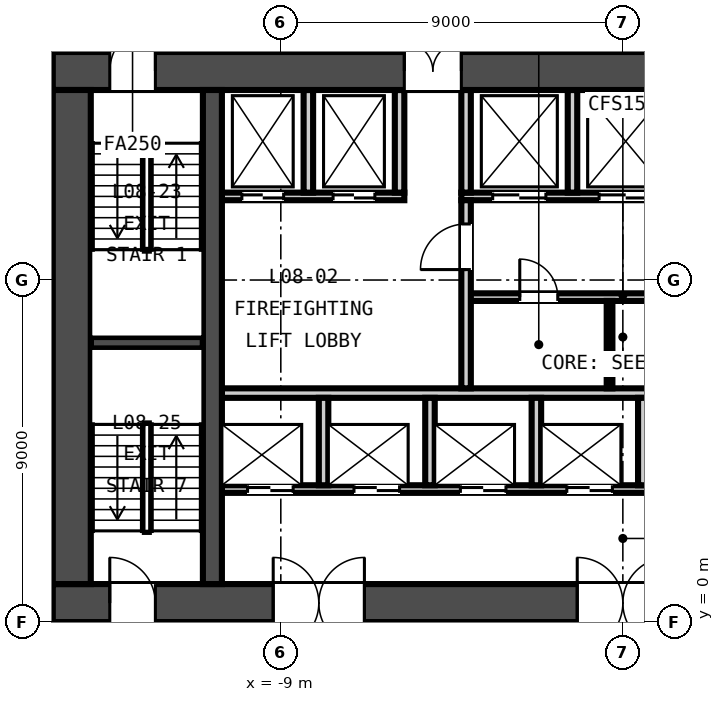
"""IFC4 building model, lengths in metres.
Left out: names, types, materials, properties, quantities, classifications, styles, units other than length and angle.
Written with IfcOpenShell. Run it as: python <this file> out.ifc"""

import sys

from ifc_helpers import new_model, si_unit, direction, frame, frame_2d, origin, place, context, subcontext, project, spatial, rectangle, extrude, element, fill, save


model = new_model("IFC4")
c1 = context("Model", 3, precision=1e-05, world=origin(), true_north=direction((0.0, 1.0)))
c2 = subcontext(c1, "Body", "Model", "MODEL_VIEW")
j1 = project(units=[si_unit("LENGTHUNIT", "METRE"), si_unit("PLANEANGLEUNIT", "RADIAN")], contexts=[c1])
p1 = place(None, origin())
s1 = spatial("IfcSite", under=j1, at=p1, CompositionType="ELEMENT")
p2 = place(p1, origin())
s2 = spatial("IfcBuilding", under=s1, at=p2, CompositionType="ELEMENT")
p3 = place(p2, frame((0.0, 0.0, 43.3)))
s3 = spatial("IfcBuildingStorey", under=s2, at=p3, CompositionType="ELEMENT", Elevation=43.3)
p4 = place(p3, frame((-15.0, 0.5, -0.15), z_axis=(0.0, 0.0, 1.0), x_axis=(1.0, 0.0, 0.0)))
e1 = element("IfcWall", 1, at=p4, inside=s3, PredefinedType="SOLIDWALL", context=c2, shape_type="SweptSolid", body=[
    extrude(rectangle(XDim=30.0, YDim=1.0, at=frame_2d((15.0, 0.0))), origin(), (0.0, 0.0, 1.0), 3.65),
])
p5 = place(p4, frame((5.8, 0.0, 0.15)))
e2 = element("IfcOpeningElement", 2, at=p5, cuts=e1, PredefinedType="OPENING", context=c2, shape_type="SweptSolid", body=[
    extrude(rectangle(XDim=2.4, YDim=2.4, at=frame_2d((1.2, 1.2))), frame((0.0, 0.51, 0.0), z_axis=(0.0, -1.0, 0.0), x_axis=(1.0, 0.0, 0.0)), (0.0, 0.0, 1.0), 1.02),
])
p6 = place(p4, frame((13.8, 0.0, 0.15)))
e3 = element("IfcOpeningElement", 3, at=p6, cuts=e1, PredefinedType="OPENING", context=c2, shape_type="SweptSolid", body=[
    extrude(rectangle(XDim=2.4, YDim=2.4, at=frame_2d((1.2, 1.2))), frame((0.0, 0.51, 0.0), z_axis=(0.0, -1.0, 0.0), x_axis=(1.0, 0.0, 0.0)), (0.0, 0.0, 1.0), 1.02),
])
p7 = place(p4, frame((21.8, 0.0, 0.15)))
e4 = element("IfcOpeningElement", 4, at=p7, cuts=e1, PredefinedType="OPENING", context=c2, shape_type="SweptSolid", body=[
    extrude(rectangle(XDim=2.4, YDim=2.4, at=frame_2d((1.2, 1.2))), frame((0.0, 0.51, 0.0), z_axis=(0.0, -1.0, 0.0), x_axis=(1.0, 0.0, 0.0)), (0.0, 0.0, 1.0), 1.02),
])
p8 = place(p4, frame((1.5, 0.0, 0.15)))
e5 = element("IfcOpeningElement", 5, at=p8, cuts=e1, PredefinedType="OPENING", context=c2, shape_type="SweptSolid", body=[
    extrude(rectangle(XDim=1.2, YDim=2.1, at=frame_2d((0.6, 1.05))), frame((0.0, 0.51, 0.0), z_axis=(0.0, -1.0, 0.0), x_axis=(1.0, 0.0, 0.0)), (0.0, 0.0, 1.0), 1.02),
])
p9 = place(p4, frame((27.3, 0.0, 0.15)))
e6 = element("IfcOpeningElement", 6, at=p9, cuts=e1, PredefinedType="OPENING", context=c2, shape_type="SweptSolid", body=[
    extrude(rectangle(XDim=1.2, YDim=2.1, at=frame_2d((0.6, 1.05))), frame((0.0, 0.51, 0.0), z_axis=(0.0, -1.0, 0.0), x_axis=(1.0, 0.0, 0.0)), (0.0, 0.0, 1.0), 1.02),
])
p10 = place(p3, frame((-15.0, 14.5, -0.15), z_axis=(0.0, 0.0, 1.0), x_axis=(1.0, 0.0, 0.0)))
e7 = element("IfcWall", 7, at=p10, inside=s3, PredefinedType="SOLIDWALL", context=c2, shape_type="SweptSolid", body=[
    extrude(rectangle(XDim=30.0, YDim=1.0, at=frame_2d((15.0, 0.0))), origin(), (0.0, 0.0, 1.0), 3.65),
])
p11 = place(p10, frame((9.25, 0.0, 0.15)))
e8 = element("IfcOpeningElement", 8, at=p11, cuts=e7, PredefinedType="OPENING", context=c2, shape_type="SweptSolid", body=[
    extrude(rectangle(XDim=1.5, YDim=2.1, at=frame_2d((0.75, 1.05))), frame((0.0, 0.51, 0.0), z_axis=(0.0, -1.0, 0.0), x_axis=(1.0, 0.0, 0.0)), (0.0, 0.0, 1.0), 1.02),
])
p12 = place(p10, frame((19.4, 0.0, 0.15)))
e9 = element("IfcOpeningElement", 9, at=p12, cuts=e7, PredefinedType="OPENING", context=c2, shape_type="SweptSolid", body=[
    extrude(rectangle(XDim=1.5, YDim=2.1, at=frame_2d((0.75, 1.05))), frame((0.0, 0.51, 0.0), z_axis=(0.0, -1.0, 0.0), x_axis=(1.0, 0.0, 0.0)), (0.0, 0.0, 1.0), 1.02),
])
p13 = place(p10, frame((1.5, 0.0, 0.15)))
e10 = element("IfcOpeningElement", 10, at=p13, cuts=e7, PredefinedType="OPENING", context=c2, shape_type="SweptSolid", body=[
    extrude(rectangle(XDim=1.2, YDim=2.1, at=frame_2d((0.6, 1.05))), frame((0.0, 0.51, 0.0), z_axis=(0.0, -1.0, 0.0), x_axis=(1.0, 0.0, 0.0)), (0.0, 0.0, 1.0), 1.02),
])
p14 = place(p10, frame((27.3, 0.0, 0.15)))
e11 = element("IfcOpeningElement", 11, at=p14, cuts=e7, PredefinedType="OPENING", context=c2, shape_type="SweptSolid", body=[
    extrude(rectangle(XDim=1.2, YDim=2.1, at=frame_2d((0.6, 1.05))), frame((0.0, 0.51, 0.0), z_axis=(0.0, -1.0, 0.0), x_axis=(1.0, 0.0, 0.0)), (0.0, 0.0, 1.0), 1.02),
])
p15 = place(p3, frame((-14.5, 1.0, -0.15), z_axis=(0.0, 0.0, 1.0), x_axis=(0.0, 1.0, 0.0)))
e12 = element("IfcWall", 12, at=p15, inside=s3, PredefinedType="SOLIDWALL", context=c2, shape_type="SweptSolid", body=[
    extrude(rectangle(XDim=13.0, YDim=1.0, at=frame_2d((6.5, 0.0))), origin(), (0.0, 0.0, 1.0), 3.65),
])
p16 = place(p3, frame((-10.8, 1.0, -0.15), z_axis=(0.0, 0.0, 1.0), x_axis=(0.0, 1.0, 0.0)))
e13 = element("IfcWall", 13, at=p16, inside=s3, PredefinedType="SOLIDWALL", context=c2, shape_type="SweptSolid", body=[
    extrude(rectangle(XDim=13.0, YDim=0.5, at=frame_2d((6.5, 0.0))), origin(), (0.0, 0.0, 1.0), 3.65),
])
p17 = place(p3, frame((-10.55, 3.5, 0.0), z_axis=(0.0, 0.0, 1.0), x_axis=(1.0, 0.0, 0.0)))
e14 = element("IfcWall", 14, at=p17, inside=s3, PredefinedType="PARTITIONING", context=c2, shape_type="SweptSolid", body=[
    extrude(rectangle(XDim=21.1, YDim=0.2, at=frame_2d((10.55, 0.0))), origin(), (0.0, 0.0, 1.0), 3.5),
])
p18 = place(p17, frame((0.675, 0.0, 0.0)))
e15 = element("IfcOpeningElement", 15, at=p18, cuts=e14, PredefinedType="OPENING", context=c2, shape_type="SweptSolid", body=[
    extrude(rectangle(XDim=1.2, YDim=2.1, at=frame_2d((0.6, 1.05))), frame((0.0, 0.11, 0.0), z_axis=(0.0, -1.0, 0.0), x_axis=(1.0, 0.0, 0.0)), (0.0, 0.0, 1.0), 0.22),
])
p19 = place(p17, frame((3.475, 0.0, 0.0)))
e16 = element("IfcOpeningElement", 16, at=p19, cuts=e14, PredefinedType="OPENING", context=c2, shape_type="SweptSolid", body=[
    extrude(rectangle(XDim=1.2, YDim=2.1, at=frame_2d((0.6, 1.05))), frame((0.0, 0.11, 0.0), z_axis=(0.0, -1.0, 0.0), x_axis=(1.0, 0.0, 0.0)), (0.0, 0.0, 1.0), 0.22),
])
p20 = place(p17, frame((6.275, 0.0, 0.0)))
e17 = element("IfcOpeningElement", 17, at=p20, cuts=e14, PredefinedType="OPENING", context=c2, shape_type="SweptSolid", body=[
    extrude(rectangle(XDim=1.2, YDim=2.1, at=frame_2d((0.6, 1.05))), frame((0.0, 0.11, 0.0), z_axis=(0.0, -1.0, 0.0), x_axis=(1.0, 0.0, 0.0)), (0.0, 0.0, 1.0), 0.22),
])
p21 = place(p17, frame((9.075, 0.0, 0.0)))
e18 = element("IfcOpeningElement", 18, at=p21, cuts=e14, PredefinedType="OPENING", context=c2, shape_type="SweptSolid", body=[
    extrude(rectangle(XDim=1.2, YDim=2.1, at=frame_2d((0.6, 1.05))), frame((0.0, 0.11, 0.0), z_axis=(0.0, -1.0, 0.0), x_axis=(1.0, 0.0, 0.0)), (0.0, 0.0, 1.0), 0.22),
])
p22 = place(p17, frame((11.875, 0.0, 0.0)))
e19 = element("IfcOpeningElement", 19, at=p22, cuts=e14, PredefinedType="OPENING", context=c2, shape_type="SweptSolid", body=[
    extrude(rectangle(XDim=1.2, YDim=2.1, at=frame_2d((0.6, 1.05))), frame((0.0, 0.11, 0.0), z_axis=(0.0, -1.0, 0.0), x_axis=(1.0, 0.0, 0.0)), (0.0, 0.0, 1.0), 0.22),
])
p23 = place(p17, frame((14.675, 0.0, 0.0)))
e20 = element("IfcOpeningElement", 20, at=p23, cuts=e14, PredefinedType="OPENING", context=c2, shape_type="SweptSolid", body=[
    extrude(rectangle(XDim=1.2, YDim=2.1, at=frame_2d((0.6, 1.05))), frame((0.0, 0.11, 0.0), z_axis=(0.0, -1.0, 0.0), x_axis=(1.0, 0.0, 0.0)), (0.0, 0.0, 1.0), 0.22),
])
p24 = place(p17, frame((17.475, 0.0, 0.0)))
e21 = element("IfcOpeningElement", 21, at=p24, cuts=e14, PredefinedType="OPENING", context=c2, shape_type="SweptSolid", body=[
    extrude(rectangle(XDim=1.2, YDim=2.1, at=frame_2d((0.6, 1.05))), frame((0.0, 0.11, 0.0), z_axis=(0.0, -1.0, 0.0), x_axis=(1.0, 0.0, 0.0)), (0.0, 0.0, 1.0), 0.22),
])
p25 = place(p17, frame((19.9, 0.0, 0.0)))
e22 = element("IfcOpeningElement", 22, at=p25, cuts=e14, PredefinedType="OPENING", context=c2, shape_type="SweptSolid", body=[
    extrude(rectangle(XDim=0.9, YDim=2.1, at=frame_2d((0.45, 1.05))), frame((0.0, 0.11, 0.0), z_axis=(0.0, -1.0, 0.0), x_axis=(1.0, 0.0, 0.0)), (0.0, 0.0, 1.0), 0.22),
])
p26 = place(p3, frame((-10.55, 6.025, 0.0), z_axis=(0.0, 0.0, 1.0), x_axis=(1.0, 0.0, 0.0)))
e23 = element("IfcWall", 23, at=p26, inside=s3, PredefinedType="PARTITIONING", context=c2, shape_type="SweptSolid", body=[
    extrude(rectangle(XDim=21.1, YDim=0.25, at=frame_2d((10.55, 0.0))), origin(), (0.0, 0.0, 1.0), 3.5),
])
p27 = place(p3, frame((-4.125, 8.55, 0.0), z_axis=(0.0, 0.0, 1.0), x_axis=(1.0, 0.0, 0.0)))
e24 = element("IfcWall", 24, at=p27, inside=s3, PredefinedType="PARTITIONING", context=c2, shape_type="SweptSolid", body=[
    extrude(rectangle(XDim=14.675, YDim=0.2, at=frame_2d((7.337, 0.0))), origin(), (0.0, 0.0, 1.0), 3.5),
])
p28 = place(p27, frame((1.413, 0.0, 0.0)))
e25 = element("IfcOpeningElement", 25, at=p28, cuts=e24, PredefinedType="OPENING", context=c2, shape_type="SweptSolid", body=[
    extrude(rectangle(XDim=1.0, YDim=2.1, at=frame_2d((0.5, 1.05))), frame((0.0, 0.11, 0.0), z_axis=(0.0, -1.0, 0.0), x_axis=(1.0, 0.0, 0.0)), (0.0, 0.0, 1.0), 0.22),
])
p29 = place(p27, frame((5.0, 0.0, 0.0)))
e26 = element("IfcOpeningElement", 26, at=p29, cuts=e24, PredefinedType="OPENING", context=c2, shape_type="SweptSolid", body=[
    extrude(rectangle(XDim=1.0, YDim=2.1, at=frame_2d((0.5, 1.05))), frame((0.0, 0.11, 0.0), z_axis=(0.0, -1.0, 0.0), x_axis=(1.0, 0.0, 0.0)), (0.0, 0.0, 1.0), 0.22),
])
p30 = place(p27, frame((9.613, 0.0, 0.0)))
e27 = element("IfcOpeningElement", 27, at=p30, cuts=e24, PredefinedType="OPENING", context=c2, shape_type="SweptSolid", body=[
    extrude(rectangle(XDim=1.0, YDim=2.1, at=frame_2d((0.5, 1.05))), frame((0.0, 0.11, 0.0), z_axis=(0.0, -1.0, 0.0), x_axis=(1.0, 0.0, 0.0)), (0.0, 0.0, 1.0), 0.22),
])
p31 = place(p27, frame((13.475, 0.0, 0.0)))
e28 = element("IfcOpeningElement", 28, at=p31, cuts=e24, PredefinedType="OPENING", context=c2, shape_type="SweptSolid", body=[
    extrude(rectangle(XDim=0.9, YDim=2.1, at=frame_2d((0.45, 1.05))), frame((0.0, 0.11, 0.0), z_axis=(0.0, -1.0, 0.0), x_axis=(1.0, 0.0, 0.0)), (0.0, 0.0, 1.0), 0.22),
])
p32 = place(p3, frame((-10.55, 11.2, 0.0), z_axis=(0.0, 0.0, 1.0), x_axis=(1.0, 0.0, 0.0)))
e29 = element("IfcWall", 29, at=p32, inside=s3, PredefinedType="PARTITIONING", context=c2, shape_type="SweptSolid", body=[
    extrude(rectangle(XDim=4.8, YDim=0.2, at=frame_2d((2.4, 0.0))), origin(), (0.0, 0.0, 1.0), 3.5),
])
p33 = place(p32, frame((0.525, 0.0, 0.0)))
e30 = element("IfcOpeningElement", 30, at=p33, cuts=e29, PredefinedType="OPENING", context=c2, shape_type="SweptSolid", body=[
    extrude(rectangle(XDim=1.1, YDim=2.1, at=frame_2d((0.55, 1.05))), frame((0.0, 0.11, 0.0), z_axis=(0.0, -1.0, 0.0), x_axis=(1.0, 0.0, 0.0)), (0.0, 0.0, 1.0), 0.22),
])
p34 = place(p32, frame((2.925, 0.0, 0.0)))
e31 = element("IfcOpeningElement", 31, at=p34, cuts=e29, PredefinedType="OPENING", context=c2, shape_type="SweptSolid", body=[
    extrude(rectangle(XDim=1.1, YDim=2.1, at=frame_2d((0.55, 1.05))), frame((0.0, 0.11, 0.0), z_axis=(0.0, -1.0, 0.0), x_axis=(1.0, 0.0, 0.0)), (0.0, 0.0, 1.0), 0.22),
])
p35 = place(p3, frame((-4.25, 11.2, 0.0), z_axis=(0.0, 0.0, 1.0), x_axis=(1.0, 0.0, 0.0)))
e32 = element("IfcWall", 32, at=p35, inside=s3, PredefinedType="PARTITIONING", context=c2, shape_type="SweptSolid", body=[
    extrude(rectangle(XDim=8.65, YDim=0.2, at=frame_2d((4.325, 0.0))), origin(), (0.0, 0.0, 1.0), 3.5),
])
p36 = place(p35, frame((0.825, 0.0, 0.0)))
e33 = element("IfcOpeningElement", 33, at=p36, cuts=e32, PredefinedType="OPENING", context=c2, shape_type="SweptSolid", body=[
    extrude(rectangle(XDim=1.4, YDim=2.1, at=frame_2d((0.7, 1.05))), frame((0.0, 0.11, 0.0), z_axis=(0.0, -1.0, 0.0), x_axis=(1.0, 0.0, 0.0)), (0.0, 0.0, 1.0), 0.22),
])
p37 = place(p35, frame((3.625, 0.0, 0.0)))
e34 = element("IfcOpeningElement", 34, at=p37, cuts=e32, PredefinedType="OPENING", context=c2, shape_type="SweptSolid", body=[
    extrude(rectangle(XDim=1.4, YDim=2.1, at=frame_2d((0.7, 1.05))), frame((0.0, 0.11, 0.0), z_axis=(0.0, -1.0, 0.0), x_axis=(1.0, 0.0, 0.0)), (0.0, 0.0, 1.0), 0.22),
])
p38 = place(p3, frame((-4.125, 6.15, 0.0), z_axis=(0.0, 0.0, 1.0), x_axis=(0.0, 1.0, 0.0)))
e35 = element("IfcWall", 35, at=p38, inside=s3, PredefinedType="PARTITIONING", context=c2, shape_type="SweptSolid", body=[
    extrude(rectangle(XDim=4.95, YDim=0.25, at=frame_2d((2.475, 0.0))), origin(), (0.0, 0.0, 1.0), 3.5),
])
p39 = place(p38, frame((3.125, 0.0, 0.0)))
e36 = element("IfcOpeningElement", 36, at=p39, cuts=e35, PredefinedType="OPENING", context=c2, shape_type="SweptSolid", body=[
    extrude(rectangle(XDim=1.2, YDim=2.1, at=frame_2d((0.6, 1.05))), frame((0.0, 0.135, 0.0), z_axis=(0.0, -1.0, 0.0), x_axis=(1.0, 0.0, 0.0)), (0.0, 0.0, 1.0), 0.27),
])
for number, where, z_axis, x_axis in (
    (37, (-7.875, 3.6, 0.0), (0.0, 0.0, 1.0), (0.0, 1.0, 0.0)),
    (38, (-5.075, 3.6, 0.0), (0.0, 0.0, 1.0), (0.0, 1.0, 0.0)),
    (39, (-2.275, 3.6, 0.0), (0.0, 0.0, 1.0), (0.0, 1.0, 0.0)),
    (40, (0.525, 3.6, 0.0), (0.0, 0.0, 1.0), (0.0, 1.0, 0.0)),
):
    element("IfcWall", number, at=place(p3, frame(where, z_axis=z_axis, x_axis=x_axis)), inside=s3, PredefinedType="PARTITIONING", context=c2, shape_type="SweptSolid", body=[
        extrude(rectangle(XDim=2.3, YDim=0.25, at=frame_2d((1.15, 0.0))), origin(), (0.0, 0.0, 1.0), 3.5),
    ])
p40 = place(p3, frame((-0.35, 6.15, 0.0), z_axis=(0.0, 0.0, 1.0), x_axis=(0.0, 1.0, 0.0)))
e41 = element("IfcWall", 41, at=p40, inside=s3, PredefinedType="PARTITIONING", context=c2, shape_type="SweptSolid", body=[
    extrude(rectangle(XDim=2.3, YDim=0.15, at=frame_2d((1.15, 0.0))), origin(), (0.0, 0.0, 1.0), 3.5),
])
for number, where, z_axis, x_axis in (
    (42, (-8.275, 11.3, 0.0), (0.0, 0.0, 1.0), (0.0, 1.0, 0.0)),
    (43, (-5.875, 11.3, 0.0), (0.0, 0.0, 1.0), (0.0, 1.0, 0.0)),
    (44, (-4.125, 11.3, 0.0), (0.0, 0.0, 1.0), (0.0, 1.0, 0.0)),
    (45, (-1.325, 11.3, 0.0), (0.0, 0.0, 1.0), (0.0, 1.0, 0.0)),
):
    element("IfcWall", number, at=place(p3, frame(where, z_axis=z_axis, x_axis=x_axis)), inside=s3, PredefinedType="PARTITIONING", context=c2, shape_type="SweptSolid", body=[
        extrude(rectangle(XDim=2.7, YDim=0.25, at=frame_2d((1.35, 0.0))), origin(), (0.0, 0.0, 1.0), 3.5),
    ])
p41 = place(p3, frame((-14.0, 7.35, -0.15), z_axis=(0.0, 0.0, 1.0), x_axis=(1.0, 0.0, 0.0)))
e46 = element("IfcWall", 46, at=p41, inside=s3, PredefinedType="SOLIDWALL", context=c2, shape_type="SweptSolid", body=[
    extrude(rectangle(XDim=2.95, YDim=0.3, at=frame_2d((1.475, 0.0))), origin(), (0.0, 0.0, 1.0), 3.65),
])
p42 = place(p39, origin())
e47 = element("IfcDoor", 47, at=p42, inside=s3, OperationType="SINGLE_SWING_LEFT", PredefinedType="DOOR", context=c2, shape_type="SweptSolid", body=[
    extrude(rectangle(XDim=1.2, YDim=2.1, at=frame_2d((0.6, 1.05))), frame((0.0, 0.025, 0.0), z_axis=(0.0, -1.0, 0.0), x_axis=(1.0, 0.0, 0.0)), (0.0, 0.0, 1.0), 0.05),
])
fill(e36, e47)
p43 = place(p18, origin())
e48 = element("IfcDoor", 48, at=p43, inside=s3, OperationType="DOUBLE_DOOR_SLIDING", PredefinedType="DOOR", context=c2, shape_type="SweptSolid", body=[
    extrude(rectangle(XDim=1.2, YDim=2.1, at=frame_2d((0.6, 1.05))), frame((0.0, 0.025, 0.0), z_axis=(0.0, -1.0, 0.0), x_axis=(1.0, 0.0, 0.0)), (0.0, 0.0, 1.0), 0.05),
])
fill(e15, e48)
p44 = place(p19, origin())
e49 = element("IfcDoor", 49, at=p44, inside=s3, OperationType="DOUBLE_DOOR_SLIDING", PredefinedType="DOOR", context=c2, shape_type="SweptSolid", body=[
    extrude(rectangle(XDim=1.2, YDim=2.1, at=frame_2d((0.6, 1.05))), frame((0.0, 0.025, 0.0), z_axis=(0.0, -1.0, 0.0), x_axis=(1.0, 0.0, 0.0)), (0.0, 0.0, 1.0), 0.05),
])
fill(e16, e49)
p45 = place(p20, origin())
e50 = element("IfcDoor", 50, at=p45, inside=s3, OperationType="DOUBLE_DOOR_SLIDING", PredefinedType="DOOR", context=c2, shape_type="SweptSolid", body=[
    extrude(rectangle(XDim=1.2, YDim=2.1, at=frame_2d((0.6, 1.05))), frame((0.0, 0.025, 0.0), z_axis=(0.0, -1.0, 0.0), x_axis=(1.0, 0.0, 0.0)), (0.0, 0.0, 1.0), 0.05),
])
fill(e17, e50)
p46 = place(p21, origin())
e51 = element("IfcDoor", 51, at=p46, inside=s3, OperationType="DOUBLE_DOOR_SLIDING", PredefinedType="DOOR", context=c2, shape_type="SweptSolid", body=[
    extrude(rectangle(XDim=1.2, YDim=2.1, at=frame_2d((0.6, 1.05))), frame((0.0, 0.025, 0.0), z_axis=(0.0, -1.0, 0.0), x_axis=(1.0, 0.0, 0.0)), (0.0, 0.0, 1.0), 0.05),
])
fill(e18, e51)
p47 = place(p28, origin())
e52 = element("IfcDoor", 52, at=p47, inside=s3, OperationType="SINGLE_SWING_LEFT", PredefinedType="DOOR", context=c2, shape_type="SweptSolid", body=[
    extrude(rectangle(XDim=1.0, YDim=2.1, at=frame_2d((0.5, 1.05))), frame((0.0, 0.025, 0.0), z_axis=(0.0, -1.0, 0.0), x_axis=(1.0, 0.0, 0.0)), (0.0, 0.0, 1.0), 0.05),
])
fill(e25, e52)
p48 = place(p33, origin())
e53 = element("IfcDoor", 53, at=p48, inside=s3, OperationType="DOUBLE_DOOR_SLIDING", PredefinedType="DOOR", context=c2, shape_type="SweptSolid", body=[
    extrude(rectangle(XDim=1.1, YDim=2.1, at=frame_2d((0.55, 1.05))), frame((0.0, 0.025, 0.0), z_axis=(0.0, -1.0, 0.0), x_axis=(1.0, 0.0, 0.0)), (0.0, 0.0, 1.0), 0.05),
])
fill(e30, e53)
p49 = place(p34, origin())
e54 = element("IfcDoor", 54, at=p49, inside=s3, OperationType="DOUBLE_DOOR_SLIDING", PredefinedType="DOOR", context=c2, shape_type="SweptSolid", body=[
    extrude(rectangle(XDim=1.1, YDim=2.1, at=frame_2d((0.55, 1.05))), frame((0.0, 0.025, 0.0), z_axis=(0.0, -1.0, 0.0), x_axis=(1.0, 0.0, 0.0)), (0.0, 0.0, 1.0), 0.05),
])
fill(e31, e54)
p50 = place(p36, origin())
e55 = element("IfcDoor", 55, at=p50, inside=s3, OperationType="DOUBLE_DOOR_SLIDING", PredefinedType="DOOR", context=c2, shape_type="SweptSolid", body=[
    extrude(rectangle(XDim=1.4, YDim=2.1, at=frame_2d((0.7, 1.05))), frame((0.0, 0.025, 0.0), z_axis=(0.0, -1.0, 0.0), x_axis=(1.0, 0.0, 0.0)), (0.0, 0.0, 1.0), 0.05),
])
fill(e33, e55)
p51 = place(p37, origin())
e56 = element("IfcDoor", 56, at=p51, inside=s3, OperationType="DOUBLE_DOOR_SLIDING", PredefinedType="DOOR", context=c2, shape_type="SweptSolid", body=[
    extrude(rectangle(XDim=1.4, YDim=2.1, at=frame_2d((0.7, 1.05))), frame((0.0, 0.025, 0.0), z_axis=(0.0, -1.0, 0.0), x_axis=(1.0, 0.0, 0.0)), (0.0, 0.0, 1.0), 0.05),
])
fill(e34, e56)
p52 = place(p5, origin())
e57 = element("IfcDoor", 57, at=p52, inside=s3, OperationType="DOUBLE_DOOR_DOUBLE_SWING", PredefinedType="DOOR", context=c2, shape_type="SweptSolid", body=[
    extrude(rectangle(XDim=2.4, YDim=2.4, at=frame_2d((1.2, 1.2))), frame((0.0, 0.025, 0.0), z_axis=(0.0, -1.0, 0.0), x_axis=(1.0, 0.0, 0.0)), (0.0, 0.0, 1.0), 0.05),
])
fill(e2, e57)
p53 = place(p6, origin())
e58 = element("IfcDoor", 58, at=p53, inside=s3, OperationType="DOUBLE_DOOR_DOUBLE_SWING", PredefinedType="DOOR", context=c2, shape_type="SweptSolid", body=[
    extrude(rectangle(XDim=2.4, YDim=2.4, at=frame_2d((1.2, 1.2))), frame((0.0, 0.025, 0.0), z_axis=(0.0, -1.0, 0.0), x_axis=(1.0, 0.0, 0.0)), (0.0, 0.0, 1.0), 0.05),
])
fill(e3, e58)
p54 = place(p11, origin())
e59 = element("IfcDoor", 59, at=p54, inside=s3, OperationType="DOUBLE_DOOR_SINGLE_SWING", PredefinedType="DOOR", context=c2, shape_type="SweptSolid", body=[
    extrude(rectangle(XDim=1.5, YDim=2.1, at=frame_2d((0.75, 1.05))), frame((0.0, 0.025, 0.0), z_axis=(0.0, -1.0, 0.0), x_axis=(1.0, 0.0, 0.0)), (0.0, 0.0, 1.0), 0.05),
])
fill(e8, e59)
p55 = place(p13, origin())
e60 = element("IfcDoor", 60, at=p55, inside=s3, OperationType="SINGLE_SWING_RIGHT", PredefinedType="DOOR", context=c2, shape_type="SweptSolid", body=[
    extrude(rectangle(XDim=1.2, YDim=2.1, at=frame_2d((0.6, 1.05))), frame((0.0, 0.025, 0.0), z_axis=(0.0, -1.0, 0.0), x_axis=(1.0, 0.0, 0.0)), (0.0, 0.0, 1.0), 0.05),
])
fill(e10, e60)
p56 = place(p8, origin())
e61 = element("IfcDoor", 61, at=p56, inside=s3, OperationType="SINGLE_SWING_LEFT", PredefinedType="DOOR", context=c2, shape_type="SweptSolid", body=[
    extrude(rectangle(XDim=1.2, YDim=2.1, at=frame_2d((0.6, 1.05))), frame((0.0, 0.025, 0.0), z_axis=(0.0, -1.0, 0.0), x_axis=(1.0, 0.0, 0.0)), (0.0, 0.0, 1.0), 0.05),
])
fill(e5, e61)
save(model, sys.argv[1])
